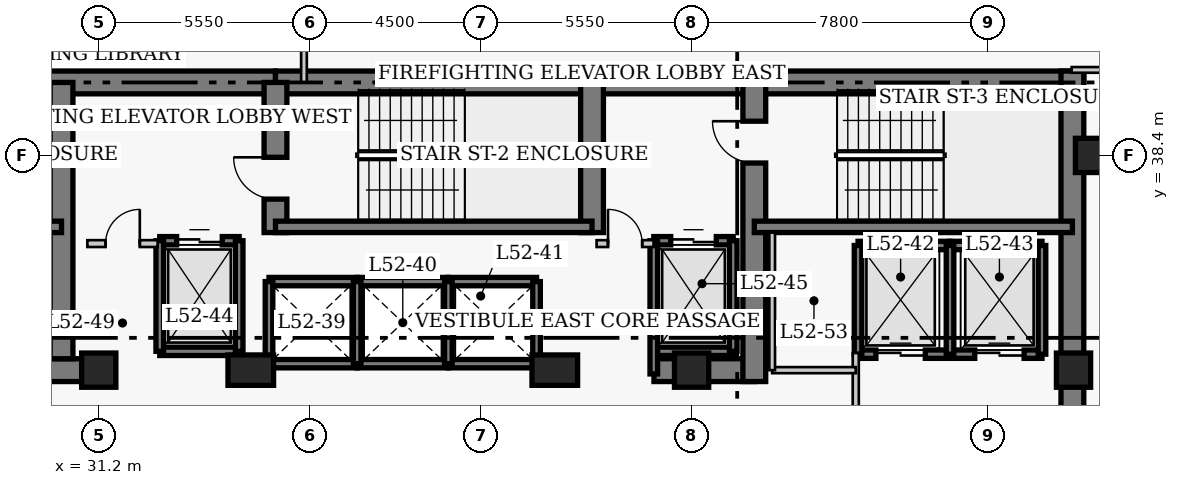
"""IFC4 building model, lengths in metres.
Left out: names, types, materials, properties, quantities, classifications, styles, units other than length and angle.
Written with IfcOpenShell. Run it as: python <this file> out.ifc"""

import sys

from ifc_helpers import new_model, si_unit, direction, frame, frame_2d, origin, origin_2d, place, context, subcontext, project, spatial, rectangle, extrude, element, fill, save


model = new_model("IFC4")
c1 = context("Model", 3, precision=1e-05, world=origin(), true_north=direction((0.0, 1.0)))
c2 = subcontext(c1, "Body", "Model", "MODEL_VIEW")
j1 = project(units=[si_unit("LENGTHUNIT", "METRE"), si_unit("PLANEANGLEUNIT", "RADIAN")], contexts=[c1])
p1 = place(None, origin())
s1 = spatial("IfcSite", under=j1, at=p1, CompositionType="ELEMENT")
p2 = place(p1, origin())
s2 = spatial("IfcBuilding", under=s1, at=p2, CompositionType="ELEMENT")
p3 = place(p2, frame((0.0, 0.0, 208.5)))
s3 = spatial("IfcBuildingStorey", under=s2, at=p3, CompositionType="ELEMENT", Elevation=208.5)
p4 = place(p3, frame((21.6, 40.32, 0.0), z_axis=(0.0, 0.0, 1.0), x_axis=(1.0, 0.0, 0.0)))
e1 = element("IfcWall", 1, at=p4, inside=s3, PredefinedType="SHEAR", context=c2, shape_type="SweptSolid", body=[
    extrude(rectangle(XDim=14.25, YDim=0.6, at=frame_2d((7.125, 0.0))), origin(), (0.0, 0.0, 1.0), 3.9),
])
p5 = place(p3, frame((35.85, 40.32, 0.0), z_axis=(0.0, 0.0, 1.0), x_axis=(1.0, 0.0, 0.0)))
e2 = element("IfcWall", 2, at=p5, inside=s3, PredefinedType="SHEAR", context=c2, shape_type="SweptSolid", body=[
    extrude(rectangle(XDim=12.6, YDim=0.6, at=frame_2d((6.3, 0.0))), origin(), (0.0, 0.0, 1.0), 3.9),
])
p6 = place(p3, frame((48.45, 40.32, 0.0), z_axis=(0.0, 0.0, 1.0), x_axis=(1.0, 0.0, 0.0)))
e3 = element("IfcWall", 3, at=p6, inside=s3, PredefinedType="SHEAR", context=c2, shape_type="SweptSolid", body=[
    extrude(rectangle(XDim=8.67, YDim=0.6, at=frame_2d((4.335, 0.0))), origin(), (0.0, 0.0, 1.0), 3.9),
])
p7 = place(p3, frame((56.82, 27.05, 0.0), z_axis=(0.0, 0.0, 1.0), x_axis=(0.0, 1.0, 0.0)))
e4 = element("IfcWall", 4, at=p7, inside=s3, PredefinedType="SHEAR", context=c2, shape_type="SweptSolid", body=[
    extrude(rectangle(XDim=13.57, YDim=0.6, at=frame_2d((6.785, 0.0))), origin(), (0.0, 0.0, 1.0), 3.9),
])
p8 = place(p3, frame((28.45, 32.75, 0.0), z_axis=(0.0, 0.0, 1.0), x_axis=(1.0, 0.0, 0.0)))
e5 = element("IfcWall", 5, at=p8, inside=s3, PredefinedType="SHEAR", context=c2, shape_type="SweptSolid", body=[
    extrude(rectangle(XDim=2.4, YDim=0.6, at=frame_2d((1.2, 0.0))), origin(), (0.0, 0.0, 1.0), 3.9),
])
p9 = place(p3, frame((45.81, 32.75, 0.0), z_axis=(0.0, 0.0, 1.0), x_axis=(1.0, 0.0, 0.0)))
e6 = element("IfcWall", 6, at=p9, inside=s3, PredefinedType="SHEAR", context=c2, shape_type="SweptSolid", body=[
    extrude(rectangle(XDim=2.64, YDim=0.6, at=frame_2d((1.32, 0.0))), origin(), (0.0, 0.0, 1.0), 3.9),
])
p10 = place(p3, frame((30.22, 33.05, 0.0), z_axis=(0.0, 0.0, 1.0), x_axis=(0.0, 1.0, 0.0)))
e7 = element("IfcWall", 7, at=p10, inside=s3, PredefinedType="SHEAR", context=c2, shape_type="SweptSolid", body=[
    extrude(rectangle(XDim=7.27, YDim=0.6, at=frame_2d((3.635, 0.0))), origin(), (0.0, 0.0, 1.0), 3.9),
])
p11 = place(p3, frame((35.85, 36.37, 0.0), z_axis=(0.0, 0.0, 1.0), x_axis=(0.0, 1.0, 0.0)))
e8 = element("IfcWall", 8, at=p11, inside=s3, PredefinedType="SHEAR", context=c2, shape_type="SweptSolid", body=[
    extrude(rectangle(XDim=3.95, YDim=0.6, at=frame_2d((1.975, 0.0))), origin(), (0.0, 0.0, 1.0), 3.9),
])
p12 = place(p11, frame((0.88, 0.0, 0.0)))
e9 = element("IfcOpeningElement", 9, at=p12, cuts=e8, PredefinedType="OPENING", context=c2, shape_type="SweptSolid", body=[
    extrude(rectangle(XDim=1.1, YDim=2.15, at=frame_2d((0.55, 1.075))), frame((0.0, 0.31, 0.0), z_axis=(0.0, -1.0, 0.0), x_axis=(1.0, 0.0, 0.0)), (0.0, 0.0, 1.0), 0.62),
])
p13 = place(p3, frame((44.18, 36.37, 0.0), z_axis=(0.0, 0.0, 1.0), x_axis=(0.0, 1.0, 0.0)))
e10 = element("IfcWall", 10, at=p13, inside=s3, PredefinedType="SHEAR", context=c2, shape_type="SweptSolid", body=[
    extrude(rectangle(XDim=3.95, YDim=0.6, at=frame_2d((1.975, 0.0))), origin(), (0.0, 0.0, 1.0), 3.9),
])
p14 = place(p3, frame((48.45, 32.45, 0.0), z_axis=(0.0, 0.0, 1.0), x_axis=(0.0, 1.0, 0.0)))
e11 = element("IfcWall", 11, at=p14, inside=s3, PredefinedType="SHEAR", context=c2, shape_type="SweptSolid", body=[
    extrude(rectangle(XDim=7.87, YDim=0.6, at=frame_2d((3.935, 0.0))), origin(), (0.0, 0.0, 1.0), 3.9),
])
p15 = place(p14, frame((5.75, 0.0, 0.0)))
e12 = element("IfcOpeningElement", 12, at=p15, cuts=e11, PredefinedType="OPENING", context=c2, shape_type="SweptSolid", body=[
    extrude(rectangle(XDim=1.1, YDim=2.15, at=frame_2d((0.55, 1.075))), frame((0.0, 0.31, 0.0), z_axis=(0.0, -1.0, 0.0), x_axis=(1.0, 0.0, 0.0)), (0.0, 0.0, 1.0), 0.62),
])
p16 = place(p3, frame((21.9, 36.52, 0.0), z_axis=(0.0, 0.0, 1.0), x_axis=(1.0, 0.0, 0.0)))
e13 = element("IfcWall", 13, at=p16, inside=s3, PredefinedType="SHEAR", context=c2, shape_type="SweptSolid", body=[
    extrude(rectangle(XDim=8.32, YDim=0.3, at=frame_2d((4.16, 0.0))), origin(), (0.0, 0.0, 1.0), 3.9),
])
p17 = place(p16, frame((0.9, 0.0, 0.0)))
e14 = element("IfcOpeningElement", 14, at=p17, cuts=e13, PredefinedType="OPENING", context=c2, shape_type="SweptSolid", body=[
    extrude(rectangle(XDim=1.1, YDim=2.15, at=frame_2d((0.55, 1.075))), frame((0.0, 0.16, 0.0), z_axis=(0.0, -1.0, 0.0), x_axis=(1.0, 0.0, 0.0)), (0.0, 0.0, 1.0), 0.32),
])
p18 = place(p3, frame((35.85, 36.52, 0.0), z_axis=(0.0, 0.0, 1.0), x_axis=(1.0, 0.0, 0.0)))
e15 = element("IfcWall", 15, at=p18, inside=s3, PredefinedType="SHEAR", context=c2, shape_type="SweptSolid", body=[
    extrude(rectangle(XDim=8.33, YDim=0.3, at=frame_2d((4.165, 0.0))), origin(), (0.0, 0.0, 1.0), 3.9),
])
p19 = place(p3, frame((48.45, 36.52, 0.0), z_axis=(0.0, 0.0, 1.0), x_axis=(1.0, 0.0, 0.0)))
e16 = element("IfcWall", 16, at=p19, inside=s3, PredefinedType="SHEAR", context=c2, shape_type="SweptSolid", body=[
    extrude(rectangle(XDim=8.37, YDim=0.3, at=frame_2d((4.185, 0.0))), origin(), (0.0, 0.0, 1.0), 3.9),
])
for number, where, z_axis, x_axis in (
    (17, (57.35, 38.4, 0.0), (0.0, 0.0, 1.0), (1.0, 0.0, 0.0)),
    (18, (31.2, 32.75, 0.0), (0.0, 0.0, 1.0), (1.0, 0.0, 0.0)),
):
    element("IfcColumn", number, at=place(p3, frame(where, z_axis=z_axis, x_axis=x_axis)), inside=s3, PredefinedType="COLUMN", context=c2, shape_type="SweptSolid", body=[
        extrude(rectangle(XDim=0.9, YDim=0.9, at=origin_2d()), origin(), (0.0, 0.0, 1.0), 3.9),
    ])
for number, where, z_axis, x_axis in (
    (19, (35.2, 32.75, 0.0), (0.0, 0.0, 1.0), (1.0, 0.0, 0.0)),
    (20, (43.2, 32.75, 0.0), (0.0, 0.0, 1.0), (1.0, 0.0, 0.0)),
):
    element("IfcColumn", number, at=place(p3, frame(where, z_axis=z_axis, x_axis=x_axis)), inside=s3, PredefinedType="COLUMN", context=c2, shape_type="SweptSolid", body=[
        extrude(rectangle(XDim=1.2, YDim=0.8, at=origin_2d()), origin(), (0.0, 0.0, 1.0), 3.9),
    ])
for number, where, z_axis, x_axis in (
    (21, (46.8, 32.75, 0.0), (0.0, 0.0, 1.0), (1.0, 0.0, 0.0)),
    (22, (56.85, 32.75, 0.0), (0.0, 0.0, 1.0), (1.0, 0.0, 0.0)),
):
    element("IfcColumn", number, at=place(p3, frame(where, z_axis=z_axis, x_axis=x_axis)), inside=s3, PredefinedType="COLUMN", context=c2, shape_type="SweptSolid", body=[
        extrude(rectangle(XDim=0.9, YDim=0.9, at=origin_2d()), origin(), (0.0, 0.0, 1.0), 3.9),
    ])
for number, where, z_axis, x_axis in (
    (23, (35.68, 35.08, 0.0), (0.0, 0.0, 1.0), (1.0, 0.0, 0.0)),
    (24, (35.68, 32.92, 0.0), (0.0, 0.0, 1.0), (1.0, 0.0, 0.0)),
):
    element("IfcWall", number, at=place(p3, frame(where, z_axis=z_axis, x_axis=x_axis)), inside=s3, PredefinedType="SHEAR", context=c2, shape_type="SweptSolid", body=[
        extrude(rectangle(XDim=2.32, YDim=0.22, at=frame_2d((1.16, 0.0))), origin(), (0.0, 0.0, 1.0), 3.9),
    ])
p20 = place(p3, frame((35.68, 32.92, 0.0), z_axis=(0.0, 0.0, 1.0), x_axis=(0.0, 1.0, 0.0)))
e25 = element("IfcWall", 25, at=p20, inside=s3, PredefinedType="SHEAR", context=c2, shape_type="SweptSolid", body=[
    extrude(rectangle(XDim=2.16, YDim=0.2, at=frame_2d((1.08, 0.0))), origin(), (0.0, 0.0, 1.0), 3.9),
])
for number, where, z_axis, x_axis in (
    (26, (38.0, 35.08, 0.0), (0.0, 0.0, 1.0), (1.0, 0.0, 0.0)),
    (27, (38.0, 32.92, 0.0), (0.0, 0.0, 1.0), (1.0, 0.0, 0.0)),
):
    element("IfcWall", number, at=place(p3, frame(where, z_axis=z_axis, x_axis=x_axis)), inside=s3, PredefinedType="SHEAR", context=c2, shape_type="SweptSolid", body=[
        extrude(rectangle(XDim=2.4, YDim=0.22, at=frame_2d((1.2, 0.0))), origin(), (0.0, 0.0, 1.0), 3.9),
    ])
p21 = place(p3, frame((38.0, 32.92, 0.0), z_axis=(0.0, 0.0, 1.0), x_axis=(0.0, 1.0, 0.0)))
e28 = element("IfcWall", 28, at=p21, inside=s3, PredefinedType="SHEAR", context=c2, shape_type="SweptSolid", body=[
    extrude(rectangle(XDim=2.16, YDim=0.2, at=frame_2d((1.08, 0.0))), origin(), (0.0, 0.0, 1.0), 3.9),
])
for number, where, z_axis, x_axis in (
    (29, (40.4, 35.08, 0.0), (0.0, 0.0, 1.0), (1.0, 0.0, 0.0)),
    (30, (40.4, 32.92, 0.0), (0.0, 0.0, 1.0), (1.0, 0.0, 0.0)),
):
    element("IfcWall", number, at=place(p3, frame(where, z_axis=z_axis, x_axis=x_axis)), inside=s3, PredefinedType="SHEAR", context=c2, shape_type="SweptSolid", body=[
        extrude(rectangle(XDim=2.32, YDim=0.22, at=frame_2d((1.16, 0.0))), origin(), (0.0, 0.0, 1.0), 3.9),
    ])
for number, where, z_axis, x_axis in (
    (31, (40.4, 32.92, 0.0), (0.0, 0.0, 1.0), (0.0, 1.0, 0.0)),
    (32, (42.72, 32.92, 0.0), (0.0, 0.0, 1.0), (0.0, 1.0, 0.0)),
):
    element("IfcWall", number, at=place(p3, frame(where, z_axis=z_axis, x_axis=x_axis)), inside=s3, PredefinedType="SHEAR", context=c2, shape_type="SweptSolid", body=[
        extrude(rectangle(XDim=2.16, YDim=0.2, at=frame_2d((1.08, 0.0))), origin(), (0.0, 0.0, 1.0), 3.9),
    ])
p22 = place(p3, frame((51.18, 36.03, 0.0), z_axis=(0.0, 0.0, 1.0), x_axis=(1.0, 0.0, 0.0)))
e33 = element("IfcWall", 33, at=p22, inside=s3, PredefinedType="SHEAR", context=c2, shape_type="SweptSolid", body=[
    extrude(rectangle(XDim=2.42, YDim=0.22, at=frame_2d((1.21, 0.0))), origin(), (0.0, 0.0, 1.0), 3.9),
])
p23 = place(p3, frame((51.18, 33.17, 0.0), z_axis=(0.0, 0.0, 1.0), x_axis=(1.0, 0.0, 0.0)))
e34 = element("IfcWall", 34, at=p23, inside=s3, PredefinedType="SHEAR", context=c2, shape_type="SweptSolid", body=[
    extrude(rectangle(XDim=2.42, YDim=0.22, at=frame_2d((1.21, 0.0))), origin(), (0.0, 0.0, 1.0), 3.9),
])
p24 = place(p23, frame((0.47, 0.0, 0.0)))
e35 = element("IfcOpeningElement", 35, at=p24, cuts=e34, PredefinedType="OPENING", context=c2, shape_type="SweptSolid", body=[
    extrude(rectangle(XDim=1.3, YDim=2.15, at=frame_2d((0.65, 1.075))), frame((0.0, 0.12, 0.0), z_axis=(0.0, -1.0, 0.0), x_axis=(1.0, 0.0, 0.0)), (0.0, 0.0, 1.0), 0.24),
])
p25 = place(p3, frame((51.18, 33.17, 0.0), z_axis=(0.0, 0.0, 1.0), x_axis=(0.0, 1.0, 0.0)))
e36 = element("IfcWall", 36, at=p25, inside=s3, PredefinedType="SHEAR", context=c2, shape_type="SweptSolid", body=[
    extrude(rectangle(XDim=2.86, YDim=0.2, at=frame_2d((1.43, 0.0))), origin(), (0.0, 0.0, 1.0), 3.9),
])
p26 = place(p3, frame((53.6, 36.03, 0.0), z_axis=(0.0, 0.0, 1.0), x_axis=(1.0, 0.0, 0.0)))
e37 = element("IfcWall", 37, at=p26, inside=s3, PredefinedType="SHEAR", context=c2, shape_type="SweptSolid", body=[
    extrude(rectangle(XDim=2.42, YDim=0.22, at=frame_2d((1.21, 0.0))), origin(), (0.0, 0.0, 1.0), 3.9),
])
p27 = place(p3, frame((53.6, 33.17, 0.0), z_axis=(0.0, 0.0, 1.0), x_axis=(1.0, 0.0, 0.0)))
e38 = element("IfcWall", 38, at=p27, inside=s3, PredefinedType="SHEAR", context=c2, shape_type="SweptSolid", body=[
    extrude(rectangle(XDim=2.42, YDim=0.22, at=frame_2d((1.21, 0.0))), origin(), (0.0, 0.0, 1.0), 3.9),
])
p28 = place(p27, frame((0.65, 0.0, 0.0)))
e39 = element("IfcOpeningElement", 39, at=p28, cuts=e38, PredefinedType="OPENING", context=c2, shape_type="SweptSolid", body=[
    extrude(rectangle(XDim=1.3, YDim=2.15, at=frame_2d((0.65, 1.075))), frame((0.0, 0.12, 0.0), z_axis=(0.0, -1.0, 0.0), x_axis=(1.0, 0.0, 0.0)), (0.0, 0.0, 1.0), 0.24),
])
for number, where, z_axis, x_axis in (
    (40, (53.6, 33.17, 0.0), (0.0, 0.0, 1.0), (0.0, 1.0, 0.0)),
    (41, (56.02, 33.17, 0.0), (0.0, 0.0, 1.0), (0.0, 1.0, 0.0)),
):
    element("IfcWall", number, at=place(p3, frame(where, z_axis=z_axis, x_axis=x_axis)), inside=s3, PredefinedType="SHEAR", context=c2, shape_type="SweptSolid", body=[
        extrude(rectangle(XDim=2.86, YDim=0.2, at=frame_2d((1.43, 0.0))), origin(), (0.0, 0.0, 1.0), 3.9),
    ])
p29 = place(p3, frame((32.805, 36.155, 0.0), z_axis=(0.0, 0.0, 1.0), x_axis=(1.0, 0.0, 0.0)))
e42 = element("IfcWall", 42, at=p29, inside=s3, PredefinedType="SHEAR", context=c2, shape_type="SweptSolid", body=[
    extrude(rectangle(XDim=2.09, YDim=0.22, at=frame_2d((1.045, 0.0))), origin(), (0.0, 0.0, 1.0), 3.9),
])
p30 = place(p29, frame((0.445, 0.0, 0.0)))
e43 = element("IfcOpeningElement", 43, at=p30, cuts=e42, PredefinedType="OPENING", context=c2, shape_type="SweptSolid", body=[
    extrude(rectangle(XDim=1.2, YDim=2.15, at=frame_2d((0.6, 1.075))), frame((0.0, 0.12, 0.0), z_axis=(0.0, -1.0, 0.0), x_axis=(1.0, 0.0, 0.0)), (0.0, 0.0, 1.0), 0.24),
])
p31 = place(p3, frame((32.805, 33.245, 0.0), z_axis=(0.0, 0.0, 1.0), x_axis=(1.0, 0.0, 0.0)))
e44 = element("IfcWall", 44, at=p31, inside=s3, PredefinedType="SHEAR", context=c2, shape_type="SweptSolid", body=[
    extrude(rectangle(XDim=2.09, YDim=0.22, at=frame_2d((1.045, 0.0))), origin(), (0.0, 0.0, 1.0), 3.9),
])
for number, where, z_axis, x_axis in (
    (45, (32.805, 33.245, 0.0), (0.0, 0.0, 1.0), (0.0, 1.0, 0.0)),
    (46, (34.895, 33.245, 0.0), (0.0, 0.0, 1.0), (0.0, 1.0, 0.0)),
):
    element("IfcWall", number, at=place(p3, frame(where, z_axis=z_axis, x_axis=x_axis)), inside=s3, PredefinedType="SHEAR", context=c2, shape_type="SweptSolid", body=[
        extrude(rectangle(XDim=2.91, YDim=0.2, at=frame_2d((1.455, 0.0))), origin(), (0.0, 0.0, 1.0), 3.9),
    ])
p32 = place(p3, frame((45.805, 36.155, 0.0), z_axis=(0.0, 0.0, 1.0), x_axis=(1.0, 0.0, 0.0)))
e47 = element("IfcWall", 47, at=p32, inside=s3, PredefinedType="SHEAR", context=c2, shape_type="SweptSolid", body=[
    extrude(rectangle(XDim=2.09, YDim=0.22, at=frame_2d((1.045, 0.0))), origin(), (0.0, 0.0, 1.0), 3.9),
])
p33 = place(p32, frame((0.445, 0.0, 0.0)))
e48 = element("IfcOpeningElement", 48, at=p33, cuts=e47, PredefinedType="OPENING", context=c2, shape_type="SweptSolid", body=[
    extrude(rectangle(XDim=1.2, YDim=2.15, at=frame_2d((0.6, 1.075))), frame((0.0, 0.12, 0.0), z_axis=(0.0, -1.0, 0.0), x_axis=(1.0, 0.0, 0.0)), (0.0, 0.0, 1.0), 0.24),
])
p34 = place(p3, frame((45.805, 33.245, 0.0), z_axis=(0.0, 0.0, 1.0), x_axis=(1.0, 0.0, 0.0)))
e49 = element("IfcWall", 49, at=p34, inside=s3, PredefinedType="SHEAR", context=c2, shape_type="SweptSolid", body=[
    extrude(rectangle(XDim=2.09, YDim=0.22, at=frame_2d((1.045, 0.0))), origin(), (0.0, 0.0, 1.0), 3.9),
])
p35 = place(p3, frame((45.805, 32.65, 0.0), z_axis=(0.0, 0.0, 1.0), x_axis=(0.0, 1.0, 0.0)))
e50 = element("IfcWall", 50, at=p35, inside=s3, PredefinedType="SHEAR", context=c2, shape_type="SweptSolid", body=[
    extrude(rectangle(XDim=3.505, YDim=0.2, at=frame_2d((1.752, 0.0))), origin(), (0.0, 0.0, 1.0), 3.9),
])
p36 = place(p3, frame((47.895, 33.245, 0.0), z_axis=(0.0, 0.0, 1.0), x_axis=(0.0, 1.0, 0.0)))
e51 = element("IfcWall", 51, at=p36, inside=s3, PredefinedType="SHEAR", context=c2, shape_type="SweptSolid", body=[
    extrude(rectangle(XDim=2.91, YDim=0.2, at=frame_2d((1.455, 0.0))), origin(), (0.0, 0.0, 1.0), 3.9),
])
p37 = place(p3, frame((30.9, 36.08, 0.0), z_axis=(0.0, 0.0, 1.0), x_axis=(1.0, 0.0, 0.0)))
e52 = element("IfcWall", 52, at=p37, inside=s3, PredefinedType="PARTITIONING", context=c2, shape_type="SweptSolid", body=[
    extrude(rectangle(XDim=1.85, YDim=0.18, at=frame_2d((0.925, 0.0))), origin(), (0.0, 0.0, 1.0), 3.65),
])
p38 = place(p37, frame((0.48, 0.0, 0.0)))
e53 = element("IfcOpeningElement", 53, at=p38, cuts=e52, PredefinedType="OPENING", context=c2, shape_type="SweptSolid", body=[
    extrude(rectangle(XDim=0.9, YDim=2.15, at=frame_2d((0.45, 1.075))), frame((0.0, 0.1, 0.0), z_axis=(0.0, -1.0, 0.0), x_axis=(1.0, 0.0, 0.0)), (0.0, 0.0, 1.0), 0.2),
])
p39 = place(p3, frame((44.3, 36.08, 0.0), z_axis=(0.0, 0.0, 1.0), x_axis=(1.0, 0.0, 0.0)))
e54 = element("IfcWall", 54, at=p39, inside=s3, PredefinedType="PARTITIONING", context=c2, shape_type="SweptSolid", body=[
    extrude(rectangle(XDim=1.5, YDim=0.18, at=frame_2d((0.75, 0.0))), origin(), (0.0, 0.0, 1.0), 3.65),
])
p40 = place(p39, frame((0.3, 0.0, 0.0)))
e55 = element("IfcOpeningElement", 55, at=p40, cuts=e54, PredefinedType="OPENING", context=c2, shape_type="SweptSolid", body=[
    extrude(rectangle(XDim=0.9, YDim=2.15, at=frame_2d((0.45, 1.075))), frame((0.0, 0.1, 0.0), z_axis=(0.0, -1.0, 0.0), x_axis=(1.0, 0.0, 0.0)), (0.0, 0.0, 1.0), 0.2),
])
p41 = place(p3, frame((51.12, 29.5, 0.0), z_axis=(0.0, 0.0, 1.0), x_axis=(0.0, 1.0, 0.0)))
e56 = element("IfcWall", 56, at=p41, inside=s3, PredefinedType="PARTITIONING", context=c2, shape_type="SweptSolid", body=[
    extrude(rectangle(XDim=3.7, YDim=0.16, at=frame_2d((1.85, 0.0))), origin(), (0.0, 0.0, 1.0), 3.65),
])
p42 = place(p41, frame((0.9, 0.0, 0.0)))
e57 = element("IfcOpeningElement", 57, at=p42, cuts=e56, PredefinedType="OPENING", context=c2, shape_type="SweptSolid", body=[
    extrude(rectangle(XDim=1.1, YDim=2.15, at=frame_2d((0.55, 1.075))), frame((0.0, 0.09, 0.0), z_axis=(0.0, -1.0, 0.0), x_axis=(1.0, 0.0, 0.0)), (0.0, 0.0, 1.0), 0.18),
])
p43 = place(p3, frame((48.92, 32.75, 0.0), z_axis=(0.0, 0.0, 1.0), x_axis=(1.0, 0.0, 0.0)))
e58 = element("IfcWall", 58, at=p43, inside=s3, PredefinedType="PARTITIONING", context=c2, shape_type="SweptSolid", body=[
    extrude(rectangle(XDim=2.2, YDim=0.16, at=frame_2d((1.1, 0.0))), origin(), (0.0, 0.0, 1.0), 3.65),
])
p44 = place(p3, frame((48.92, 32.75, 0.0), z_axis=(0.0, 0.0, 1.0), x_axis=(0.0, 1.0, 0.0)))
e59 = element("IfcWall", 59, at=p44, inside=s3, PredefinedType="PARTITIONING", context=c2, shape_type="SweptSolid", body=[
    extrude(rectangle(XDim=3.62, YDim=0.15, at=frame_2d((1.81, 0.0))), origin(), (0.0, 0.0, 1.0), 3.65),
])
p45 = place(p3, frame((56.8, 40.65, 0.0), z_axis=(0.0, 0.0, 1.0), x_axis=(1.0, 0.0, 0.0)))
e60 = element("IfcWall", 60, at=p45, inside=s3, PredefinedType="PARTITIONING", context=c2, shape_type="SweptSolid", body=[
    extrude(rectangle(XDim=3.66, YDim=0.15, at=frame_2d((1.83, 0.0))), origin(), (0.0, 0.0, 1.0), 3.65),
])
p46 = place(p45, frame((2.05, 0.0, 0.0)))
e61 = element("IfcOpeningElement", 61, at=p46, cuts=e60, PredefinedType="OPENING", context=c2, shape_type="SweptSolid", body=[
    extrude(rectangle(XDim=1.0, YDim=2.15, at=frame_2d((0.5, 1.075))), frame((0.0, 0.085, 0.0), z_axis=(0.0, -1.0, 0.0), x_axis=(1.0, 0.0, 0.0)), (0.0, 0.0, 1.0), 0.17),
])
p47 = place(p3, frame((36.6, 40.32, 0.0), z_axis=(0.0, 0.0, 1.0), x_axis=(0.0, 1.0, 0.0)))
e62 = element("IfcWall", 62, at=p47, inside=s3, PredefinedType="PARTITIONING", context=c2, shape_type="SweptSolid", body=[
    extrude(rectangle(XDim=2.345, YDim=0.15, at=frame_2d((1.172, 0.0))), origin(), (0.0, 0.0, 1.0), 3.65),
])
p48 = place(p24, origin())
e63 = element("IfcDoor", 63, at=p48, inside=s3, OperationType="DOUBLE_DOOR_SLIDING", PredefinedType="DOOR", context=c2, shape_type="SweptSolid", body=[
    extrude(rectangle(XDim=1.3, YDim=2.15, at=frame_2d((0.65, 1.075))), frame((0.0, 0.025, 0.0), z_axis=(0.0, -1.0, 0.0), x_axis=(1.0, 0.0, 0.0)), (0.0, 0.0, 1.0), 0.05),
])
fill(e35, e63)
p49 = place(p28, origin())
e64 = element("IfcDoor", 64, at=p49, inside=s3, OperationType="DOUBLE_DOOR_SLIDING", PredefinedType="DOOR", context=c2, shape_type="SweptSolid", body=[
    extrude(rectangle(XDim=1.3, YDim=2.15, at=frame_2d((0.65, 1.075))), frame((0.0, 0.025, 0.0), z_axis=(0.0, -1.0, 0.0), x_axis=(1.0, 0.0, 0.0)), (0.0, 0.0, 1.0), 0.05),
])
fill(e39, e64)
p50 = place(p30, origin())
e65 = element("IfcDoor", 65, at=p50, inside=s3, OperationType="DOUBLE_DOOR_SLIDING", PredefinedType="DOOR", context=c2, shape_type="SweptSolid", body=[
    extrude(rectangle(XDim=1.2, YDim=2.15, at=frame_2d((0.6, 1.075))), frame((0.0, 0.025, 0.0), z_axis=(0.0, -1.0, 0.0), x_axis=(1.0, 0.0, 0.0)), (0.0, 0.0, 1.0), 0.05),
])
fill(e43, e65)
p51 = place(p33, origin())
e66 = element("IfcDoor", 66, at=p51, inside=s3, OperationType="DOUBLE_DOOR_SLIDING", PredefinedType="DOOR", context=c2, shape_type="SweptSolid", body=[
    extrude(rectangle(XDim=1.2, YDim=2.15, at=frame_2d((0.6, 1.075))), frame((0.0, 0.025, 0.0), z_axis=(0.0, -1.0, 0.0), x_axis=(1.0, 0.0, 0.0)), (0.0, 0.0, 1.0), 0.05),
])
fill(e48, e66)
p52 = place(p38, origin())
e67 = element("IfcDoor", 67, at=p52, inside=s3, OperationType="SINGLE_SWING_RIGHT", PredefinedType="DOOR", context=c2, shape_type="SweptSolid", body=[
    extrude(rectangle(XDim=0.9, YDim=2.15, at=frame_2d((0.45, 1.075))), frame((0.0, 0.025, 0.0), z_axis=(0.0, -1.0, 0.0), x_axis=(1.0, 0.0, 0.0)), (0.0, 0.0, 1.0), 0.05),
])
fill(e53, e67)
p53 = place(p40, origin())
e68 = element("IfcDoor", 68, at=p53, inside=s3, OperationType="SINGLE_SWING_LEFT", PredefinedType="DOOR", context=c2, shape_type="SweptSolid", body=[
    extrude(rectangle(XDim=0.9, YDim=2.15, at=frame_2d((0.45, 1.075))), frame((0.0, 0.025, 0.0), z_axis=(0.0, -1.0, 0.0), x_axis=(1.0, 0.0, 0.0)), (0.0, 0.0, 1.0), 0.05),
])
fill(e55, e68)
p54 = place(p12, origin())
e69 = element("IfcDoor", 69, at=p54, inside=s3, OperationType="SINGLE_SWING_RIGHT", PredefinedType="DOOR", context=c2, shape_type="SweptSolid", body=[
    extrude(rectangle(XDim=1.1, YDim=2.15, at=frame_2d((0.55, 1.075))), frame((0.0, 0.025, 0.0), z_axis=(0.0, -1.0, 0.0), x_axis=(1.0, 0.0, 0.0)), (0.0, 0.0, 1.0), 0.05),
])
fill(e9, e69)
p55 = place(p15, origin())
e70 = element("IfcDoor", 70, at=p55, inside=s3, OperationType="SINGLE_SWING_RIGHT", PredefinedType="DOOR", context=c2, shape_type="SweptSolid", body=[
    extrude(rectangle(XDim=1.1, YDim=2.15, at=frame_2d((0.55, 1.075))), frame((0.0, 0.025, 0.0), z_axis=(0.0, -1.0, 0.0), x_axis=(1.0, 0.0, 0.0)), (0.0, 0.0, 1.0), 0.05),
])
fill(e12, e70)
save(model, sys.argv[1])
